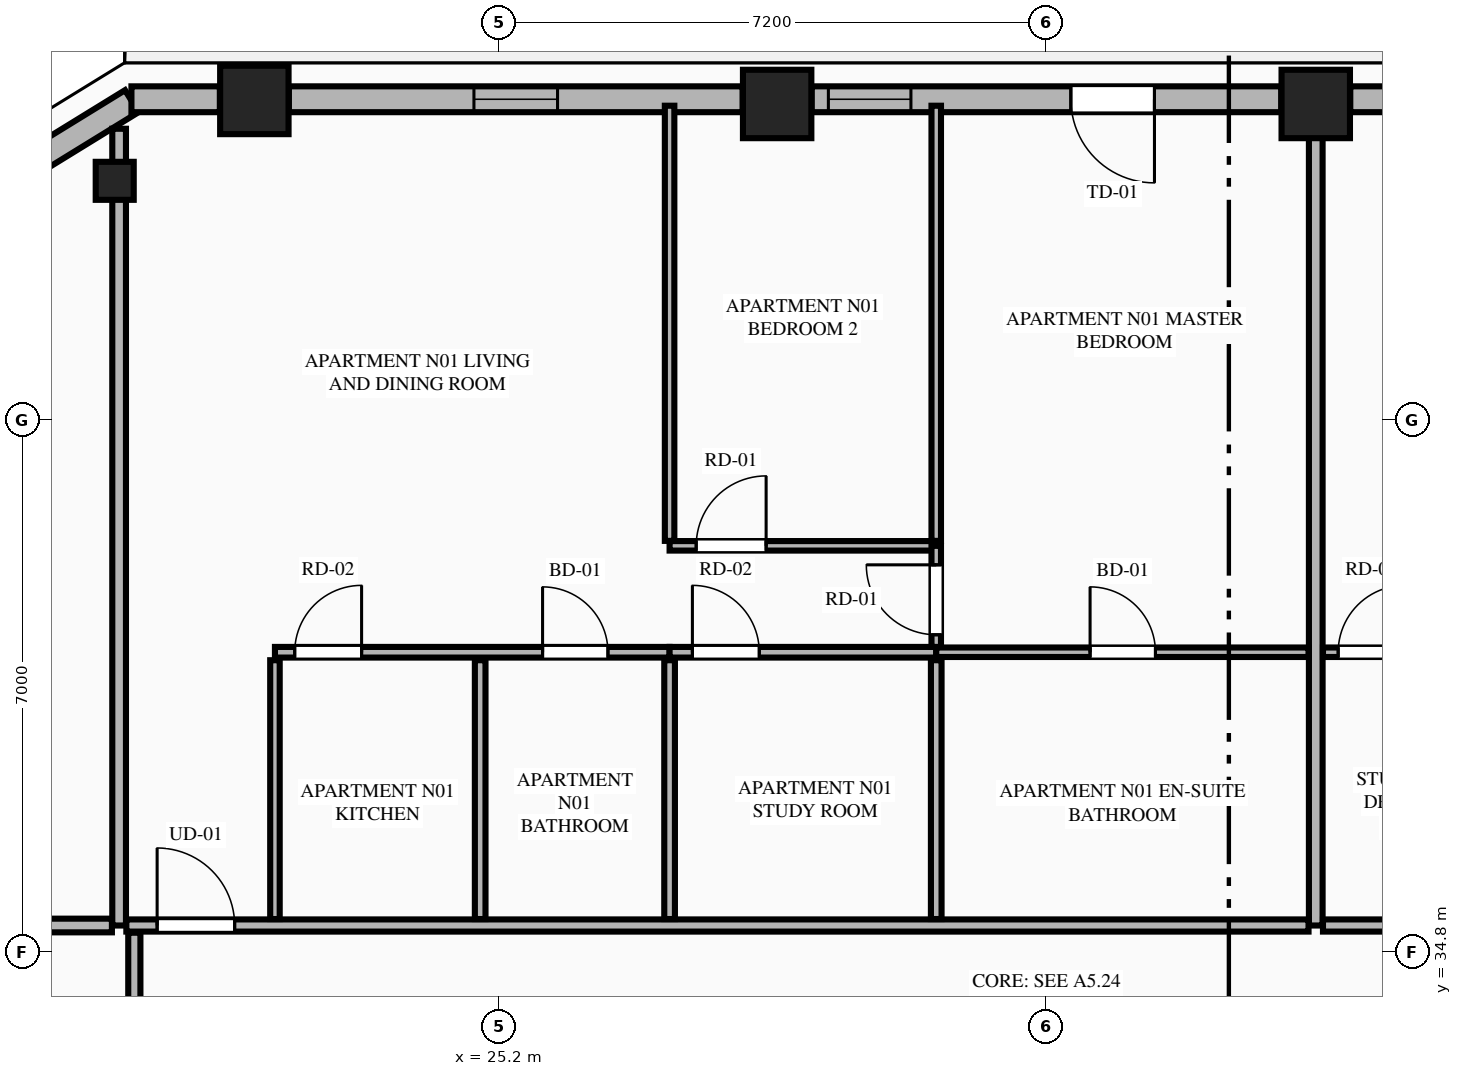
"""IFC4 building model, lengths in metres.
Left out: names, types, materials, properties, quantities, classifications, styles, units other than length and angle.
Written with IfcOpenShell. Run it as: python <this file> out.ifc"""

import sys

from ifc_helpers import new_model, si_unit, direction, frame, frame_2d, origin, origin_2d, place, context, subcontext, project, spatial, rectangle, extrude, element, fill, save


model = new_model("IFC4")
c1 = context("Model", 3, precision=1e-05, world=origin(), true_north=direction((0.0, 1.0)))
c2 = subcontext(c1, "Body", "Model", "MODEL_VIEW")
j1 = project(units=[si_unit("LENGTHUNIT", "METRE"), si_unit("PLANEANGLEUNIT", "RADIAN")], contexts=[c1])
p1 = place(None, origin())
s1 = spatial("IfcSite", under=j1, at=p1, CompositionType="ELEMENT")
p2 = place(p1, origin())
s2 = spatial("IfcBuilding", under=s1, at=p2, CompositionType="ELEMENT")
p3 = place(p2, frame((0.0, 0.0, 179.0)))
s3 = spatial("IfcBuildingStorey", under=s2, at=p3, CompositionType="ELEMENT", Elevation=179.0)
for number, where, z_axis, x_axis in (
    (1, (35.943, 45.958, 0.0), (0.0, 0.0, 1.0), (1.0, 0.0, 0.0)),
    (2, (28.857, 45.958, 0.0), (0.0, 0.0, 1.0), (1.0, 0.0, 0.0)),
    (3, (21.979, 46.011, 0.0), (0.0, 0.0, 1.0), (1.0, 0.0, 0.0)),
):
    element("IfcColumn", number, at=place(p3, frame(where, z_axis=z_axis, x_axis=x_axis)), inside=s3, PredefinedType="COLUMN", context=c2, shape_type="SweptSolid", body=[
        extrude(rectangle(XDim=0.9, YDim=0.9, at=origin_2d()), origin(), (0.0, 0.0, 1.0), 3.55),
    ])
p4 = place(p3, frame((20.142, 44.947, 0.0), z_axis=(0.0, 0.0, 1.0), x_axis=(-0.865230187018, -0.501374833306, 0.0)))
e4 = element("IfcColumn", 4, at=p4, inside=s3, PredefinedType="PILASTER", context=c2, shape_type="SweptSolid", body=[
    extrude(rectangle(XDim=0.5, YDim=0.35, at=origin_2d()), origin(), (0.0, 0.0, 1.0), 3.55),
])
p5 = place(p3, frame((20.367, 45.995, 0.0), z_axis=(0.0, 0.0, 1.0), x_axis=(-0.851713271379, -0.524008113828, 0.0)))
e5 = element("IfcWall", 5, at=p5, inside=s3, PredefinedType="STANDARD", context=c2, shape_type="SweptSolid", body=[
    extrude(rectangle(XDim=1.678, YDim=0.34, at=frame_2d((0.839, 0.0))), origin(), (0.0, 0.0, 1.0), 3.35),
])
p6 = place(p3, frame((42.367, 46.02, 0.0), z_axis=(0.0, 0.0, 1.0), x_axis=(-1.0, 0.0, 0.0)))
e6 = element("IfcWall", 6, at=p6, inside=s3, PredefinedType="STANDARD", context=c2, shape_type="SweptSolid", body=[
    extrude(rectangle(XDim=5.97, YDim=0.34, at=frame_2d((2.985, 0.0))), origin(), (0.0, 0.0, 1.0), 2.883),
])
p7 = place(p6, frame((2.435, 0.0, 0.75)))
e7 = element("IfcOpeningElement", 7, at=p7, cuts=e6, PredefinedType="OPENING", context=c2, shape_type="SweptSolid", body=[
    extrude(rectangle(XDim=1.1, YDim=1.983, at=frame_2d((0.55, 0.991))), frame((0.0, 0.18, 0.0), z_axis=(0.0, -1.0, 0.0), x_axis=(1.0, 0.0, 0.0)), (0.0, 0.0, 1.0), 0.36),
])
p8 = place(p3, frame((35.489, 46.02, 0.0), z_axis=(0.0, 0.0, 1.0), x_axis=(-1.0, 0.0, 0.0)))
e8 = element("IfcWall", 8, at=p8, inside=s3, PredefinedType="STANDARD", context=c2, shape_type="SweptSolid", body=[
    extrude(rectangle(XDim=6.178, YDim=0.34, at=frame_2d((3.089, 0.0))), origin(), (0.0, 0.0, 1.0), 2.883),
])
p9 = place(p8, frame((1.668, 0.0, 0.0)))
e9 = element("IfcOpeningElement", 9, at=p9, cuts=e8, PredefinedType="OPENING", context=c2, shape_type="SweptSolid", body=[
    extrude(rectangle(XDim=1.1, YDim=2.25, at=frame_2d((0.55, 1.125))), frame((0.0, 0.18, 0.0), z_axis=(0.0, -1.0, 0.0), x_axis=(1.0, 0.0, 0.0)), (0.0, 0.0, 1.0), 0.36),
])
p10 = place(p8, frame((4.872, 0.0, 0.75)))
e10 = element("IfcOpeningElement", 10, at=p10, cuts=e8, PredefinedType="OPENING", context=c2, shape_type="SweptSolid", body=[
    extrude(rectangle(XDim=1.086, YDim=1.983, at=frame_2d((0.543, 0.991))), frame((0.0, 0.18, 0.0), z_axis=(0.0, -1.0, 0.0), x_axis=(1.0, 0.0, 0.0)), (0.0, 0.0, 1.0), 0.36),
])
p11 = place(p3, frame((28.403, 46.02, 0.0), z_axis=(0.0, 0.0, 1.0), x_axis=(-1.0, 0.0, 0.0)))
e11 = element("IfcWall", 11, at=p11, inside=s3, PredefinedType="STANDARD", context=c2, shape_type="SweptSolid", body=[
    extrude(rectangle(XDim=5.97, YDim=0.34, at=frame_2d((2.985, 0.0))), origin(), (0.0, 0.0, 1.0), 2.883),
])
p12 = place(p11, frame((2.435, 0.0, 0.75)))
e12 = element("IfcOpeningElement", 12, at=p12, cuts=e11, PredefinedType="OPENING", context=c2, shape_type="SweptSolid", body=[
    extrude(rectangle(XDim=1.1, YDim=1.983, at=frame_2d((0.55, 0.991))), frame((0.0, 0.18, 0.0), z_axis=(0.0, -1.0, 0.0), x_axis=(1.0, 0.0, 0.0)), (0.0, 0.0, 1.0), 0.36),
])
p13 = place(p3, frame((21.525, 46.02, 0.0), z_axis=(0.0, 0.0, 1.0), x_axis=(-1.0, 0.0, 0.0)))
e13 = element("IfcWall", 13, at=p13, inside=s3, PredefinedType="STANDARD", context=c2, shape_type="SweptSolid", body=[
    extrude(rectangle(XDim=1.163, YDim=0.34, at=frame_2d((0.582, 0.0))), origin(), (0.0, 0.0, 1.0), 3.35),
])
p14 = place(p3, frame((20.2, 35.15, 0.0), z_axis=(0.0, 0.0, 1.0), x_axis=(0.0, 1.0, 0.0)))
e14 = element("IfcWall", 14, at=p14, inside=s3, PredefinedType="PARTITIONING", context=c2, shape_type="SweptSolid", body=[
    extrude(rectangle(XDim=10.482, YDim=0.18, at=frame_2d((5.241, 0.0))), origin(), (0.0, 0.0, 1.0), 3.35),
])
p15 = place(p3, frame((35.943, 35.15, 0.0), z_axis=(0.0, 0.0, 1.0), x_axis=(0.0, 1.0, 0.0)))
e15 = element("IfcWall", 15, at=p15, inside=s3, PredefinedType="PARTITIONING", context=c2, shape_type="SweptSolid", body=[
    extrude(rectangle(XDim=10.695, YDim=0.18, at=frame_2d((5.348, 0.0))), origin(), (0.0, 0.0, 1.0), 2.807),
])
p16 = place(p3, frame((20.295, 35.15, 0.0), z_axis=(0.0, 0.0, 1.0), x_axis=(1.0, 0.0, 0.0)))
e16 = element("IfcWall", 16, at=p16, inside=s3, PredefinedType="PARTITIONING", context=c2, shape_type="SweptSolid", body=[
    extrude(rectangle(XDim=15.553, YDim=0.16, at=frame_2d((7.776, 0.0))), origin(), (0.0, 0.0, 1.0), 3.35),
])
p17 = place(p16, frame((0.405, 0.0, 0.0)))
e17 = element("IfcOpeningElement", 17, at=p17, cuts=e16, PredefinedType="OPENING", context=c2, shape_type="SweptSolid", body=[
    extrude(rectangle(XDim=1.02, YDim=2.25, at=frame_2d((0.51, 1.125))), frame((0.0, 0.09, 0.0), z_axis=(0.0, -1.0, 0.0), x_axis=(1.0, 0.0, 0.0)), (0.0, 0.0, 1.0), 0.18),
])
p18 = place(p3, frame((22.25, 35.235, 0.0), z_axis=(0.0, 0.0, 1.0), x_axis=(0.0, 1.0, 0.0)))
e18 = element("IfcWall", 18, at=p18, inside=s3, PredefinedType="PARTITIONING", context=c2, shape_type="SweptSolid", body=[
    extrude(rectangle(XDim=3.405, YDim=0.125, at=frame_2d((1.702, 0.0))), origin(), (0.0, 0.0, 1.0), 2.807),
])
p19 = place(p3, frame((22.25, 38.745, 0.0), z_axis=(0.0, 0.0, 1.0), x_axis=(1.0, 0.0, 0.0)))
e19 = element("IfcWall", 19, at=p19, inside=s3, PredefinedType="PLUMBINGWALL", context=c2, shape_type="SweptSolid", body=[
    extrude(rectangle(XDim=5.192, YDim=0.14, at=frame_2d((2.596, 0.0))), origin(), (0.0, 0.0, 1.0), 3.35),
])
p20 = place(p19, frame((3.521, 0.0, 0.0)))
e20 = element("IfcOpeningElement", 20, at=p20, cuts=e19, PredefinedType="OPENING", context=c2, shape_type="SweptSolid", body=[
    extrude(rectangle(XDim=0.86, YDim=2.1, at=frame_2d((0.43, 1.05))), frame((0.0, 0.08, 0.0), z_axis=(0.0, -1.0, 0.0), x_axis=(1.0, 0.0, 0.0)), (0.0, 0.0, 1.0), 0.16),
])
p21 = place(p19, frame((0.26, 0.0, 0.0)))
e21 = element("IfcOpeningElement", 21, at=p21, cuts=e19, PredefinedType="OPENING", context=c2, shape_type="SweptSolid", body=[
    extrude(rectangle(XDim=0.88, YDim=2.15, at=frame_2d((0.44, 1.075))), frame((0.0, 0.08, 0.0), z_axis=(0.0, -1.0, 0.0), x_axis=(1.0, 0.0, 0.0)), (0.0, 0.0, 1.0), 0.16),
])
p22 = place(p3, frame((27.442, 38.745, 0.0), z_axis=(0.0, 0.0, 1.0), x_axis=(1.0, 0.0, 0.0)))
e22 = element("IfcWall", 22, at=p22, inside=s3, PredefinedType="PLUMBINGWALL", context=c2, shape_type="SweptSolid", body=[
    extrude(rectangle(XDim=3.508, YDim=0.14, at=frame_2d((1.754, 0.0))), origin(), (0.0, 0.0, 1.0), 3.35),
])
p23 = place(p22, frame((0.3, 0.0, 0.0)))
e23 = element("IfcOpeningElement", 23, at=p23, cuts=e22, PredefinedType="OPENING", context=c2, shape_type="SweptSolid", body=[
    extrude(rectangle(XDim=0.88, YDim=2.15, at=frame_2d((0.44, 1.075))), frame((0.0, 0.08, 0.0), z_axis=(0.0, -1.0, 0.0), x_axis=(1.0, 0.0, 0.0)), (0.0, 0.0, 1.0), 0.16),
])
p24 = place(p3, frame((30.95, 38.745, 0.0), z_axis=(0.0, 0.0, 1.0), x_axis=(1.0, 0.0, 0.0)))
e24 = element("IfcWall", 24, at=p24, inside=s3, PredefinedType="PARTITIONING", context=c2, shape_type="SweptSolid", body=[
    extrude(rectangle(XDim=4.898, YDim=0.125, at=frame_2d((2.449, 0.0))), origin(), (0.0, 0.0, 1.0), 3.35),
])
p25 = place(p24, frame((2.024, 0.0, 0.0)))
e25 = element("IfcOpeningElement", 25, at=p25, cuts=e24, PredefinedType="OPENING", context=c2, shape_type="SweptSolid", body=[
    extrude(rectangle(XDim=0.86, YDim=2.1, at=frame_2d((0.43, 1.05))), frame((0.0, 0.073, 0.0), z_axis=(0.0, -1.0, 0.0), x_axis=(1.0, 0.0, 0.0)), (0.0, 0.0, 1.0), 0.145),
])
p26 = place(p3, frame((24.95, 35.235, 0.0), z_axis=(0.0, 0.0, 1.0), x_axis=(0.0, 1.0, 0.0)))
e26 = element("IfcWall", 26, at=p26, inside=s3, PredefinedType="PLUMBINGWALL", context=c2, shape_type="SweptSolid", body=[
    extrude(rectangle(XDim=3.405, YDim=0.14, at=frame_2d((1.702, 0.0))), origin(), (0.0, 0.0, 1.0), 3.35),
])
p27 = place(p3, frame((27.442, 40.21, 0.0), z_axis=(0.0, 0.0, 1.0), x_axis=(0.0, 1.0, 0.0)))
e27 = element("IfcWall", 27, at=p27, inside=s3, PredefinedType="PARTITIONING", context=c2, shape_type="SweptSolid", body=[
    extrude(rectangle(XDim=5.725, YDim=0.125, at=frame_2d((2.863, 0.0))), origin(), (0.0, 0.0, 1.0), 3.35),
])
p28 = place(p3, frame((27.442, 40.145, 0.0), z_axis=(0.0, 0.0, 1.0), x_axis=(1.0, 0.0, 0.0)))
e28 = element("IfcWall", 28, at=p28, inside=s3, PredefinedType="PARTITIONING", context=c2, shape_type="SweptSolid", body=[
    extrude(rectangle(XDim=3.508, YDim=0.125, at=frame_2d((1.754, 0.0))), origin(), (0.0, 0.0, 1.0), 3.35),
])
p29 = place(p28, frame((0.35, 0.0, 0.0)))
e29 = element("IfcOpeningElement", 29, at=p29, cuts=e28, PredefinedType="OPENING", context=c2, shape_type="SweptSolid", body=[
    extrude(rectangle(XDim=0.92, YDim=2.15, at=frame_2d((0.46, 1.075))), frame((0.0, 0.073, 0.0), z_axis=(0.0, -1.0, 0.0), x_axis=(1.0, 0.0, 0.0)), (0.0, 0.0, 1.0), 0.145),
])
p30 = place(p3, frame((30.95, 38.815, 0.0), z_axis=(0.0, 0.0, 1.0), x_axis=(0.0, 1.0, 0.0)))
e30 = element("IfcWall", 30, at=p30, inside=s3, PredefinedType="PARTITIONING", context=c2, shape_type="SweptSolid", body=[
    extrude(rectangle(XDim=1.33, YDim=0.125, at=frame_2d((0.665, 0.0))), origin(), (0.0, 0.0, 1.0), 3.35),
])
p31 = place(p30, frame((0.16, 0.0, 0.0)))
e31 = element("IfcOpeningElement", 31, at=p31, cuts=e30, PredefinedType="OPENING", context=c2, shape_type="SweptSolid", body=[
    extrude(rectangle(XDim=0.92, YDim=2.15, at=frame_2d((0.46, 1.075))), frame((0.0, 0.073, 0.0), z_axis=(0.0, -1.0, 0.0), x_axis=(1.0, 0.0, 0.0)), (0.0, 0.0, 1.0), 0.145),
])
for number, where, z_axis, x_axis in (
    (32, (27.442, 35.235, 0.0), (0.0, 0.0, 1.0), (0.0, 1.0, 0.0)),
    (33, (30.95, 35.235, 0.0), (0.0, 0.0, 1.0), (0.0, 1.0, 0.0)),
):
    element("IfcWall", number, at=place(p3, frame(where, z_axis=z_axis, x_axis=x_axis)), inside=s3, PredefinedType="PLUMBINGWALL", context=c2, shape_type="SweptSolid", body=[
        extrude(rectangle(XDim=3.405, YDim=0.14, at=frame_2d((1.702, 0.0))), origin(), (0.0, 0.0, 1.0), 3.35),
    ])
p32 = place(p3, frame((30.95, 40.21, 0.0), z_axis=(0.0, 0.0, 1.0), x_axis=(0.0, 1.0, 0.0)))
e34 = element("IfcWall", 34, at=p32, inside=s3, PredefinedType="PARTITIONING", context=c2, shape_type="SweptSolid", body=[
    extrude(rectangle(XDim=5.725, YDim=0.125, at=frame_2d((2.863, 0.0))), origin(), (0.0, 0.0, 1.0), 3.35),
])
p33 = place(p3, frame((36.038, 35.15, 0.0), z_axis=(0.0, 0.0, 1.0), x_axis=(1.0, 0.0, 0.0)))
e35 = element("IfcWall", 35, at=p33, inside=s3, PredefinedType="PARTITIONING", context=c2, shape_type="SweptSolid", body=[
    extrude(rectangle(XDim=8.467, YDim=0.16, at=frame_2d((4.233, 0.0))), origin(), (0.0, 0.0, 1.0), 3.35),
])
p34 = place(p33, frame((6.212, 0.0, 0.0)))
e36 = element("IfcOpeningElement", 36, at=p34, cuts=e35, PredefinedType="OPENING", context=c2, shape_type="SweptSolid", body=[
    extrude(rectangle(XDim=1.02, YDim=2.25, at=frame_2d((0.51, 1.125))), frame((0.0, 0.09, 0.0), z_axis=(0.0, -1.0, 0.0), x_axis=(1.0, 0.0, 0.0)), (0.0, 0.0, 1.0), 0.18),
])
p35 = place(p3, frame((36.038, 38.745, 0.0), z_axis=(0.0, 0.0, 1.0), x_axis=(1.0, 0.0, 0.0)))
e37 = element("IfcWall", 37, at=p35, inside=s3, PredefinedType="PARTITIONING", context=c2, shape_type="SweptSolid", body=[
    extrude(rectangle(XDim=2.362, YDim=0.125, at=frame_2d((1.181, 0.0))), origin(), (0.0, 0.0, 1.0), 3.35),
])
p36 = place(p35, frame((0.2, 0.0, 0.0)))
e38 = element("IfcOpeningElement", 38, at=p36, cuts=e37, PredefinedType="OPENING", context=c2, shape_type="SweptSolid", body=[
    extrude(rectangle(XDim=0.88, YDim=2.15, at=frame_2d((0.44, 1.075))), frame((0.0, 0.073, 0.0), z_axis=(0.0, -1.0, 0.0), x_axis=(1.0, 0.0, 0.0)), (0.0, 0.0, 1.0), 0.145),
])
p37 = place(p3, frame((14.11, 35.15, 0.0), z_axis=(0.0, 0.0, 1.0), x_axis=(1.0, 0.0, 0.0)))
e39 = element("IfcWall", 39, at=p37, inside=s3, PredefinedType="PARTITIONING", context=c2, shape_type="SweptSolid", body=[
    extrude(rectangle(XDim=5.995, YDim=0.18, at=frame_2d((2.998, 0.0))), origin(), (0.0, 0.0, 1.0), 3.35),
])
p38 = place(p3, frame((20.4, 16.345, 0.0), z_axis=(0.0, 0.0, 1.0), x_axis=(0.0, 1.0, 0.0)))
e40 = element("IfcWall", 40, at=p38, inside=s3, PredefinedType="PARTITIONING", context=c2, shape_type="SweptSolid", body=[
    extrude(rectangle(XDim=18.71, YDim=0.16, at=frame_2d((9.355, 0.0))), origin(), (0.0, 0.0, 1.0), 3.35),
])
p39 = place(p38, frame((0.45, 0.0, 0.0)))
e41 = element("IfcOpeningElement", 41, at=p39, cuts=e40, PredefinedType="OPENING", context=c2, shape_type="SweptSolid", body=[
    extrude(rectangle(XDim=1.02, YDim=2.25, at=frame_2d((0.51, 1.125))), frame((0.0, 0.09, 0.0), z_axis=(0.0, -1.0, 0.0), x_axis=(1.0, 0.0, 0.0)), (0.0, 0.0, 1.0), 0.18),
])
p40 = place(p9, origin())
e42 = element("IfcDoor", 42, at=p40, inside=s3, OperationType="SINGLE_SWING_LEFT", PredefinedType="DOOR", context=c2, shape_type="SweptSolid", body=[
    extrude(rectangle(XDim=1.1, YDim=2.25, at=frame_2d((0.55, 1.125))), frame((0.0, 0.025, 0.0), z_axis=(0.0, -1.0, 0.0), x_axis=(1.0, 0.0, 0.0)), (0.0, 0.0, 1.0), 0.05),
])
fill(e9, e42)
p41 = place(p12, origin())
e43 = element("IfcWindow", 43, at=p41, inside=s3, PartitioningType="SINGLE_PANEL", PredefinedType="WINDOW", context=c2, shape_type="SweptSolid", body=[
    extrude(rectangle(XDim=1.1, YDim=1.983, at=frame_2d((0.55, 0.991))), frame((0.0, 0.03, 0.0), z_axis=(0.0, -1.0, 0.0), x_axis=(1.0, 0.0, 0.0)), (0.0, 0.0, 1.0), 0.06),
])
fill(e12, e43)
p42 = place(p20, origin())
e44 = element("IfcDoor", 44, at=p42, inside=s3, OperationType="SINGLE_SWING_LEFT", PredefinedType="DOOR", context=c2, shape_type="SweptSolid", body=[
    extrude(rectangle(XDim=0.86, YDim=2.1, at=frame_2d((0.43, 1.05))), frame((0.0, 0.025, 0.0), z_axis=(0.0, -1.0, 0.0), x_axis=(1.0, 0.0, 0.0)), (0.0, 0.0, 1.0), 0.05),
])
fill(e20, e44)
p43 = place(p25, origin())
e45 = element("IfcDoor", 45, at=p43, inside=s3, OperationType="SINGLE_SWING_LEFT", PredefinedType="DOOR", context=c2, shape_type="SweptSolid", body=[
    extrude(rectangle(XDim=0.86, YDim=2.1, at=frame_2d((0.43, 1.05))), frame((0.0, 0.025, 0.0), z_axis=(0.0, -1.0, 0.0), x_axis=(1.0, 0.0, 0.0)), (0.0, 0.0, 1.0), 0.05),
])
fill(e25, e45)
p44 = place(p17, origin())
e46 = element("IfcDoor", 46, at=p44, inside=s3, OperationType="SINGLE_SWING_LEFT", PredefinedType="DOOR", context=c2, shape_type="SweptSolid", body=[
    extrude(rectangle(XDim=1.02, YDim=2.25, at=frame_2d((0.51, 1.125))), frame((0.0, 0.025, 0.0), z_axis=(0.0, -1.0, 0.0), x_axis=(1.0, 0.0, 0.0)), (0.0, 0.0, 1.0), 0.05),
])
fill(e17, e46)
p45 = place(p21, origin())
e47 = element("IfcDoor", 47, at=p45, inside=s3, OperationType="SINGLE_SWING_RIGHT", PredefinedType="DOOR", context=c2, shape_type="SweptSolid", body=[
    extrude(rectangle(XDim=0.88, YDim=2.15, at=frame_2d((0.44, 1.075))), frame((0.0, 0.025, 0.0), z_axis=(0.0, -1.0, 0.0), x_axis=(1.0, 0.0, 0.0)), (0.0, 0.0, 1.0), 0.05),
])
fill(e21, e47)
p46 = place(p23, origin())
e48 = element("IfcDoor", 48, at=p46, inside=s3, OperationType="SINGLE_SWING_LEFT", PredefinedType="DOOR", context=c2, shape_type="SweptSolid", body=[
    extrude(rectangle(XDim=0.88, YDim=2.15, at=frame_2d((0.44, 1.075))), frame((0.0, 0.025, 0.0), z_axis=(0.0, -1.0, 0.0), x_axis=(1.0, 0.0, 0.0)), (0.0, 0.0, 1.0), 0.05),
])
fill(e23, e48)
p47 = place(p29, origin())
e49 = element("IfcDoor", 49, at=p47, inside=s3, OperationType="SINGLE_SWING_RIGHT", PredefinedType="DOOR", context=c2, shape_type="SweptSolid", body=[
    extrude(rectangle(XDim=0.92, YDim=2.15, at=frame_2d((0.46, 1.075))), frame((0.0, 0.025, 0.0), z_axis=(0.0, -1.0, 0.0), x_axis=(1.0, 0.0, 0.0)), (0.0, 0.0, 1.0), 0.05),
])
fill(e29, e49)
p48 = place(p31, origin())
e50 = element("IfcDoor", 50, at=p48, inside=s3, OperationType="SINGLE_SWING_RIGHT", PredefinedType="DOOR", context=c2, shape_type="SweptSolid", body=[
    extrude(rectangle(XDim=0.92, YDim=2.15, at=frame_2d((0.46, 1.075))), frame((0.0, 0.025, 0.0), z_axis=(0.0, -1.0, 0.0), x_axis=(1.0, 0.0, 0.0)), (0.0, 0.0, 1.0), 0.05),
])
fill(e31, e50)
p49 = place(p36, origin())
e51 = element("IfcDoor", 51, at=p49, inside=s3, OperationType="SINGLE_SWING_RIGHT", PredefinedType="DOOR", context=c2, shape_type="SweptSolid", body=[
    extrude(rectangle(XDim=0.88, YDim=2.15, at=frame_2d((0.44, 1.075))), frame((0.0, 0.025, 0.0), z_axis=(0.0, -1.0, 0.0), x_axis=(1.0, 0.0, 0.0)), (0.0, 0.0, 1.0), 0.05),
])
fill(e38, e51)
p50 = place(p10, origin())
e52 = element("IfcWindow", 52, at=p50, inside=s3, PartitioningType="SINGLE_PANEL", PredefinedType="WINDOW", context=c2, shape_type="SweptSolid", body=[
    extrude(rectangle(XDim=1.086, YDim=1.983, at=frame_2d((0.543, 0.991))), frame((0.0, 0.03, 0.0), z_axis=(0.0, -1.0, 0.0), x_axis=(1.0, 0.0, 0.0)), (0.0, 0.0, 1.0), 0.06),
])
fill(e10, e52)
save(model, sys.argv[1])
